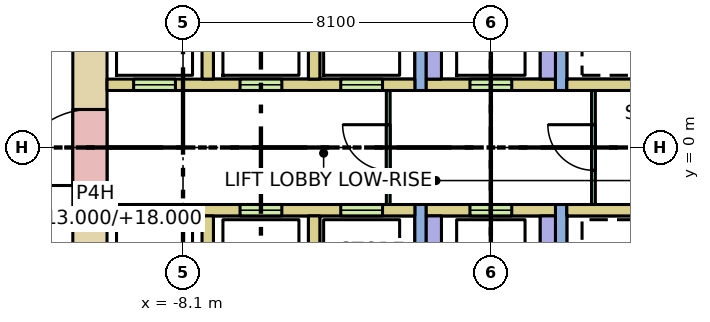
"""IFC4 building model, lengths in metres.
Left out: names, types, materials, properties, quantities, classifications, styles, units other than length and angle.
Written with IfcOpenShell. Run it as: python <this file> out.ifc"""

import sys

from ifc_helpers import new_model, si_unit, direction, frame, frame_2d, origin, place, context, subcontext, project, spatial, rectangle, extrude, element, fill, save


model = new_model("IFC4")
c1 = context("Model", 3, precision=1e-05, world=origin(), true_north=direction((0.0, 1.0)))
c2 = subcontext(c1, "Body", "Model", "MODEL_VIEW")
j1 = project(units=[si_unit("LENGTHUNIT", "METRE"), si_unit("PLANEANGLEUNIT", "RADIAN")], contexts=[c1])
p1 = place(None, origin())
s1 = spatial("IfcSite", under=j1, at=p1, CompositionType="ELEMENT")
p2 = place(p1, origin())
s2 = spatial("IfcBuilding", under=s1, at=p2, CompositionType="ELEMENT")
p3 = place(p2, frame((0.0, 0.0, 13.0)))
s3 = spatial("IfcBuildingStorey", under=s2, at=p3, CompositionType="ELEMENT", Elevation=13.0)
p4 = place(p3, frame((-10.55, -5.13, -0.32), z_axis=(0.0, 0.0, 1.0), x_axis=(0.0, 1.0, 0.0)))
e1 = element("IfcWall", 1, at=p4, inside=s3, PredefinedType="SHEAR", context=c2, shape_type="SweptSolid", body=[
    extrude(rectangle(XDim=10.26, YDim=0.9, at=frame_2d((5.13, 0.0))), origin(), (0.0, 0.0, 1.0), 7.0),
])
p5 = place(p4, frame((4.13, 0.0, 0.32)))
e2 = element("IfcOpeningElement", 2, at=p5, cuts=e1, PredefinedType="OPENING", context=c2, shape_type="SweptSolid", body=[
    extrude(rectangle(XDim=2.0, YDim=2.1, at=frame_2d((1.0, 1.05))), frame((0.0, 0.46, 0.0), z_axis=(0.0, -1.0, 0.0), x_axis=(1.0, 0.0, 0.0)), (0.0, 0.0, 1.0), 0.92),
])
p6 = place(p3, frame((-10.1, 1.65, 0.0), z_axis=(0.0, 0.0, 1.0), x_axis=(1.0, 0.0, 0.0)))
e3 = element("IfcWall", 3, at=p6, inside=s3, PredefinedType="SOLIDWALL", context=c2, shape_type="SweptSolid", body=[
    extrude(rectangle(XDim=8.1, YDim=0.3, at=frame_2d((4.05, 0.0))), origin(), (0.0, 0.0, 1.0), 6.68),
])
p7 = place(p6, frame((0.7, 0.0, 0.0)))
e4 = element("IfcOpeningElement", 4, at=p7, cuts=e3, PredefinedType="OPENING", context=c2, shape_type="SweptSolid", body=[
    extrude(rectangle(XDim=1.1, YDim=2.1, at=frame_2d((0.55, 1.05))), frame((0.0, 0.16, 0.0), z_axis=(0.0, -1.0, 0.0), x_axis=(1.0, 0.0, 0.0)), (0.0, 0.0, 1.0), 0.32),
])
p8 = place(p6, frame((3.5, 0.0, 0.0)))
e5 = element("IfcOpeningElement", 5, at=p8, cuts=e3, PredefinedType="OPENING", context=c2, shape_type="SweptSolid", body=[
    extrude(rectangle(XDim=1.1, YDim=2.1, at=frame_2d((0.55, 1.05))), frame((0.0, 0.16, 0.0), z_axis=(0.0, -1.0, 0.0), x_axis=(1.0, 0.0, 0.0)), (0.0, 0.0, 1.0), 0.32),
])
p9 = place(p6, frame((6.15, 0.0, 0.0)))
e6 = element("IfcOpeningElement", 6, at=p9, cuts=e3, PredefinedType="OPENING", context=c2, shape_type="SweptSolid", body=[
    extrude(rectangle(XDim=1.1, YDim=2.1, at=frame_2d((0.55, 1.05))), frame((0.0, 0.16, 0.0), z_axis=(0.0, -1.0, 0.0), x_axis=(1.0, 0.0, 0.0)), (0.0, 0.0, 1.0), 0.32),
])
p10 = place(p3, frame((-10.1, -1.65, 0.0), z_axis=(0.0, 0.0, 1.0), x_axis=(1.0, 0.0, 0.0)))
e7 = element("IfcWall", 7, at=p10, inside=s3, PredefinedType="SOLIDWALL", context=c2, shape_type="SweptSolid", body=[
    extrude(rectangle(XDim=8.1, YDim=0.3, at=frame_2d((4.05, 0.0))), origin(), (0.0, 0.0, 1.0), 6.68),
])
p11 = place(p10, frame((0.7, 0.0, 0.0)))
e8 = element("IfcOpeningElement", 8, at=p11, cuts=e7, PredefinedType="OPENING", context=c2, shape_type="SweptSolid", body=[
    extrude(rectangle(XDim=1.1, YDim=2.1, at=frame_2d((0.55, 1.05))), frame((0.0, 0.16, 0.0), z_axis=(0.0, -1.0, 0.0), x_axis=(1.0, 0.0, 0.0)), (0.0, 0.0, 1.0), 0.32),
])
p12 = place(p10, frame((3.5, 0.0, 0.0)))
e9 = element("IfcOpeningElement", 9, at=p12, cuts=e7, PredefinedType="OPENING", context=c2, shape_type="SweptSolid", body=[
    extrude(rectangle(XDim=1.1, YDim=2.1, at=frame_2d((0.55, 1.05))), frame((0.0, 0.16, 0.0), z_axis=(0.0, -1.0, 0.0), x_axis=(1.0, 0.0, 0.0)), (0.0, 0.0, 1.0), 0.32),
])
p13 = place(p10, frame((6.15, 0.0, 0.0)))
e10 = element("IfcOpeningElement", 10, at=p13, cuts=e7, PredefinedType="OPENING", context=c2, shape_type="SweptSolid", body=[
    extrude(rectangle(XDim=1.1, YDim=2.1, at=frame_2d((0.55, 1.05))), frame((0.0, 0.16, 0.0), z_axis=(0.0, -1.0, 0.0), x_axis=(1.0, 0.0, 0.0)), (0.0, 0.0, 1.0), 0.32),
])
for number, where, z_axis, x_axis in (
    (11, (2.0, 1.65, 0.0), (0.0, 0.0, 1.0), (1.0, 0.0, 0.0)),
    (12, (2.0, -1.65, 0.0), (0.0, 0.0, 1.0), (1.0, 0.0, 0.0)),
):
    element("IfcWall", number, at=place(p3, frame(where, z_axis=z_axis, x_axis=x_axis)), inside=s3, PredefinedType="SOLIDWALL", context=c2, shape_type="SweptSolid", body=[
        extrude(rectangle(XDim=8.1, YDim=0.3, at=frame_2d((4.05, 0.0))), origin(), (0.0, 0.0, 1.0), 6.68),
    ])
for number, where, z_axis, x_axis in (
    (13, (-7.45, 1.8, 0.0), (0.0, 0.0, 1.0), (0.0, 1.0, 0.0)),
    (14, (-7.45, -4.2, 0.0), (0.0, 0.0, 1.0), (0.0, 1.0, 0.0)),
    (15, (-4.65, 1.8, 0.0), (0.0, 0.0, 1.0), (0.0, 1.0, 0.0)),
    (16, (-4.65, -4.2, 0.0), (0.0, 0.0, 1.0), (0.0, 1.0, 0.0)),
):
    element("IfcWall", number, at=place(p3, frame(where, z_axis=z_axis, x_axis=x_axis)), inside=s3, PredefinedType="SOLIDWALL", context=c2, shape_type="SweptSolid", body=[
        extrude(rectangle(XDim=2.4, YDim=0.3, at=frame_2d((1.2, 0.0))), origin(), (0.0, 0.0, 1.0), 6.68),
    ])
for number, where, z_axis, x_axis in (
    (17, (-1.85, 1.5, 0.0), (0.0, 0.0, 1.0), (0.0, 1.0, 0.0)),
    (18, (-1.85, -8.1, 0.0), (0.0, 0.0, 1.0), (0.0, 1.0, 0.0)),
    (19, (1.85, 1.5, 0.0), (0.0, 0.0, 1.0), (0.0, 1.0, 0.0)),
    (20, (1.85, -8.1, 0.0), (0.0, 0.0, 1.0), (0.0, 1.0, 0.0)),
):
    element("IfcWall", number, at=place(p3, frame(where, z_axis=z_axis, x_axis=x_axis)), inside=s3, PredefinedType="SHEAR", context=c2, shape_type="SweptSolid", body=[
        extrude(rectangle(XDim=6.6, YDim=0.3, at=frame_2d((3.3, 0.0))), origin(), (0.0, 0.0, 1.0), 6.68),
    ])
p14 = place(p3, frame((-1.7, 1.65, 0.0), z_axis=(0.0, 0.0, 1.0), x_axis=(1.0, 0.0, 0.0)))
e21 = element("IfcWall", 21, at=p14, inside=s3, PredefinedType="SOLIDWALL", context=c2, shape_type="SweptSolid", body=[
    extrude(rectangle(XDim=3.4, YDim=0.3, at=frame_2d((1.7, 0.0))), origin(), (0.0, 0.0, 1.0), 6.68),
])
p15 = place(p14, frame((1.15, 0.0, 0.0)))
e22 = element("IfcOpeningElement", 22, at=p15, cuts=e21, PredefinedType="OPENING", context=c2, shape_type="SweptSolid", body=[
    extrude(rectangle(XDim=1.1, YDim=2.1, at=frame_2d((0.55, 1.05))), frame((0.0, 0.16, 0.0), z_axis=(0.0, -1.0, 0.0), x_axis=(1.0, 0.0, 0.0)), (0.0, 0.0, 1.0), 0.32),
])
p16 = place(p3, frame((-1.7, -1.65, 0.0), z_axis=(0.0, 0.0, 1.0), x_axis=(1.0, 0.0, 0.0)))
e23 = element("IfcWall", 23, at=p16, inside=s3, PredefinedType="SOLIDWALL", context=c2, shape_type="SweptSolid", body=[
    extrude(rectangle(XDim=3.4, YDim=0.3, at=frame_2d((1.7, 0.0))), origin(), (0.0, 0.0, 1.0), 6.68),
])
p17 = place(p16, frame((1.15, 0.0, 0.0)))
e24 = element("IfcOpeningElement", 24, at=p17, cuts=e23, PredefinedType="OPENING", context=c2, shape_type="SweptSolid", body=[
    extrude(rectangle(XDim=1.1, YDim=2.1, at=frame_2d((0.55, 1.05))), frame((0.0, 0.16, 0.0), z_axis=(0.0, -1.0, 0.0), x_axis=(1.0, 0.0, 0.0)), (0.0, 0.0, 1.0), 0.32),
])
for number, where, z_axis, x_axis in (
    (25, (-1.5, 1.8, 0.0), (0.0, 0.0, 1.0), (0.0, 1.0, 0.0)),
    (26, (-1.5, -4.8, 0.0), (0.0, 0.0, 1.0), (0.0, 1.0, 0.0)),
    (27, (1.5, 1.8, 0.0), (0.0, 0.0, 1.0), (0.0, 1.0, 0.0)),
    (28, (1.5, -4.8, 0.0), (0.0, 0.0, 1.0), (0.0, 1.0, 0.0)),
):
    element("IfcWall", number, at=place(p3, frame(where, z_axis=z_axis, x_axis=x_axis)), inside=s3, PredefinedType="SOLIDWALL", context=c2, shape_type="SweptSolid", body=[
        extrude(rectangle(XDim=3.0, YDim=0.4, at=frame_2d((1.5, 0.0))), origin(), (0.0, 0.0, 1.0), 6.68),
    ])
p18 = place(p3, frame((-2.7, -1.5, 0.0), z_axis=(0.0, 0.0, 1.0), x_axis=(0.0, 1.0, 0.0)))
e29 = element("IfcWall", 29, at=p18, inside=s3, PredefinedType="PARTITIONING", context=c2, shape_type="SweptSolid", body=[
    extrude(rectangle(XDim=3.0, YDim=0.1, at=frame_2d((1.5, 0.0))), origin(), (0.0, 0.0, 1.0), 6.68),
])
p19 = place(p18, frame((0.9, 0.0, 0.0)))
e30 = element("IfcOpeningElement", 30, at=p19, cuts=e29, PredefinedType="OPENING", context=c2, shape_type="SweptSolid", body=[
    extrude(rectangle(XDim=1.2, YDim=2.1, at=frame_2d((0.6, 1.05))), frame((0.0, 0.06, 0.0), z_axis=(0.0, -1.0, 0.0), x_axis=(1.0, 0.0, 0.0)), (0.0, 0.0, 1.0), 0.12),
])
p20 = place(p3, frame((2.7, -1.5, 0.0), z_axis=(0.0, 0.0, 1.0), x_axis=(0.0, 1.0, 0.0)))
e31 = element("IfcWall", 31, at=p20, inside=s3, PredefinedType="PARTITIONING", context=c2, shape_type="SweptSolid", body=[
    extrude(rectangle(XDim=3.0, YDim=0.1, at=frame_2d((1.5, 0.0))), origin(), (0.0, 0.0, 1.0), 6.68),
])
p21 = place(p20, frame((0.9, 0.0, 0.0)))
e32 = element("IfcOpeningElement", 32, at=p21, cuts=e31, PredefinedType="OPENING", context=c2, shape_type="SweptSolid", body=[
    extrude(rectangle(XDim=1.2, YDim=2.1, at=frame_2d((0.6, 1.05))), frame((0.0, 0.06, 0.0), z_axis=(0.0, -1.0, 0.0), x_axis=(1.0, 0.0, 0.0)), (0.0, 0.0, 1.0), 0.12),
])
p22 = place(p7, origin())
e33 = element("IfcDoor", 33, at=p22, inside=s3, OperationType="DOUBLE_DOOR_SLIDING", PredefinedType="DOOR", context=c2, shape_type="SweptSolid", body=[
    extrude(rectangle(XDim=1.1, YDim=2.1, at=frame_2d((0.55, 1.05))), frame((0.0, 0.025, 0.0), z_axis=(0.0, -1.0, 0.0), x_axis=(1.0, 0.0, 0.0)), (0.0, 0.0, 1.0), 0.05),
])
fill(e4, e33)
p23 = place(p8, origin())
e34 = element("IfcDoor", 34, at=p23, inside=s3, OperationType="DOUBLE_DOOR_SLIDING", PredefinedType="DOOR", context=c2, shape_type="SweptSolid", body=[
    extrude(rectangle(XDim=1.1, YDim=2.1, at=frame_2d((0.55, 1.05))), frame((0.0, 0.025, 0.0), z_axis=(0.0, -1.0, 0.0), x_axis=(1.0, 0.0, 0.0)), (0.0, 0.0, 1.0), 0.05),
])
fill(e5, e34)
p24 = place(p9, origin())
e35 = element("IfcDoor", 35, at=p24, inside=s3, OperationType="DOUBLE_DOOR_SLIDING", PredefinedType="DOOR", context=c2, shape_type="SweptSolid", body=[
    extrude(rectangle(XDim=1.1, YDim=2.1, at=frame_2d((0.55, 1.05))), frame((0.0, 0.025, 0.0), z_axis=(0.0, -1.0, 0.0), x_axis=(1.0, 0.0, 0.0)), (0.0, 0.0, 1.0), 0.05),
])
fill(e6, e35)
p25 = place(p11, origin())
e36 = element("IfcDoor", 36, at=p25, inside=s3, OperationType="DOUBLE_DOOR_SLIDING", PredefinedType="DOOR", context=c2, shape_type="SweptSolid", body=[
    extrude(rectangle(XDim=1.1, YDim=2.1, at=frame_2d((0.55, 1.05))), frame((0.0, 0.025, 0.0), z_axis=(0.0, -1.0, 0.0), x_axis=(1.0, 0.0, 0.0)), (0.0, 0.0, 1.0), 0.05),
])
fill(e8, e36)
p26 = place(p12, origin())
e37 = element("IfcDoor", 37, at=p26, inside=s3, OperationType="DOUBLE_DOOR_SLIDING", PredefinedType="DOOR", context=c2, shape_type="SweptSolid", body=[
    extrude(rectangle(XDim=1.1, YDim=2.1, at=frame_2d((0.55, 1.05))), frame((0.0, 0.025, 0.0), z_axis=(0.0, -1.0, 0.0), x_axis=(1.0, 0.0, 0.0)), (0.0, 0.0, 1.0), 0.05),
])
fill(e9, e37)
p27 = place(p13, origin())
e38 = element("IfcDoor", 38, at=p27, inside=s3, OperationType="DOUBLE_DOOR_SLIDING", PredefinedType="DOOR", context=c2, shape_type="SweptSolid", body=[
    extrude(rectangle(XDim=1.1, YDim=2.1, at=frame_2d((0.55, 1.05))), frame((0.0, 0.025, 0.0), z_axis=(0.0, -1.0, 0.0), x_axis=(1.0, 0.0, 0.0)), (0.0, 0.0, 1.0), 0.05),
])
fill(e10, e38)
p28 = place(p15, origin())
e39 = element("IfcDoor", 39, at=p28, inside=s3, OperationType="DOUBLE_DOOR_SLIDING", PredefinedType="DOOR", context=c2, shape_type="SweptSolid", body=[
    extrude(rectangle(XDim=1.1, YDim=2.1, at=frame_2d((0.55, 1.05))), frame((0.0, 0.025, 0.0), z_axis=(0.0, -1.0, 0.0), x_axis=(1.0, 0.0, 0.0)), (0.0, 0.0, 1.0), 0.05),
])
fill(e22, e39)
p29 = place(p17, origin())
e40 = element("IfcDoor", 40, at=p29, inside=s3, OperationType="DOUBLE_DOOR_SLIDING", PredefinedType="DOOR", context=c2, shape_type="SweptSolid", body=[
    extrude(rectangle(XDim=1.1, YDim=2.1, at=frame_2d((0.55, 1.05))), frame((0.0, 0.025, 0.0), z_axis=(0.0, -1.0, 0.0), x_axis=(1.0, 0.0, 0.0)), (0.0, 0.0, 1.0), 0.05),
])
fill(e24, e40)
p30 = place(p5, origin())
e41 = element("IfcDoor", 41, at=p30, inside=s3, OperationType="DOUBLE_DOOR_SINGLE_SWING", PredefinedType="DOOR", context=c2, shape_type="SweptSolid", body=[
    extrude(rectangle(XDim=2.0, YDim=2.1, at=frame_2d((1.0, 1.05))), frame((0.0, 0.025, 0.0), z_axis=(0.0, -1.0, 0.0), x_axis=(1.0, 0.0, 0.0)), (0.0, 0.0, 1.0), 0.05),
])
fill(e2, e41)
p31 = place(p19, origin())
e42 = element("IfcDoor", 42, at=p31, inside=s3, OperationType="SINGLE_SWING_RIGHT", PredefinedType="DOOR", context=c2, shape_type="SweptSolid", body=[
    extrude(rectangle(XDim=1.2, YDim=2.1, at=frame_2d((0.6, 1.05))), frame((0.0, 0.025, 0.0), z_axis=(0.0, -1.0, 0.0), x_axis=(1.0, 0.0, 0.0)), (0.0, 0.0, 1.0), 0.05),
])
fill(e30, e42)
p32 = place(p21, origin())
e43 = element("IfcDoor", 43, at=p32, inside=s3, OperationType="SINGLE_SWING_RIGHT", PredefinedType="DOOR", context=c2, shape_type="SweptSolid", body=[
    extrude(rectangle(XDim=1.2, YDim=2.1, at=frame_2d((0.6, 1.05))), frame((0.0, 0.025, 0.0), z_axis=(0.0, -1.0, 0.0), x_axis=(1.0, 0.0, 0.0)), (0.0, 0.0, 1.0), 0.05),
])
fill(e32, e43)
save(model, sys.argv[1])
